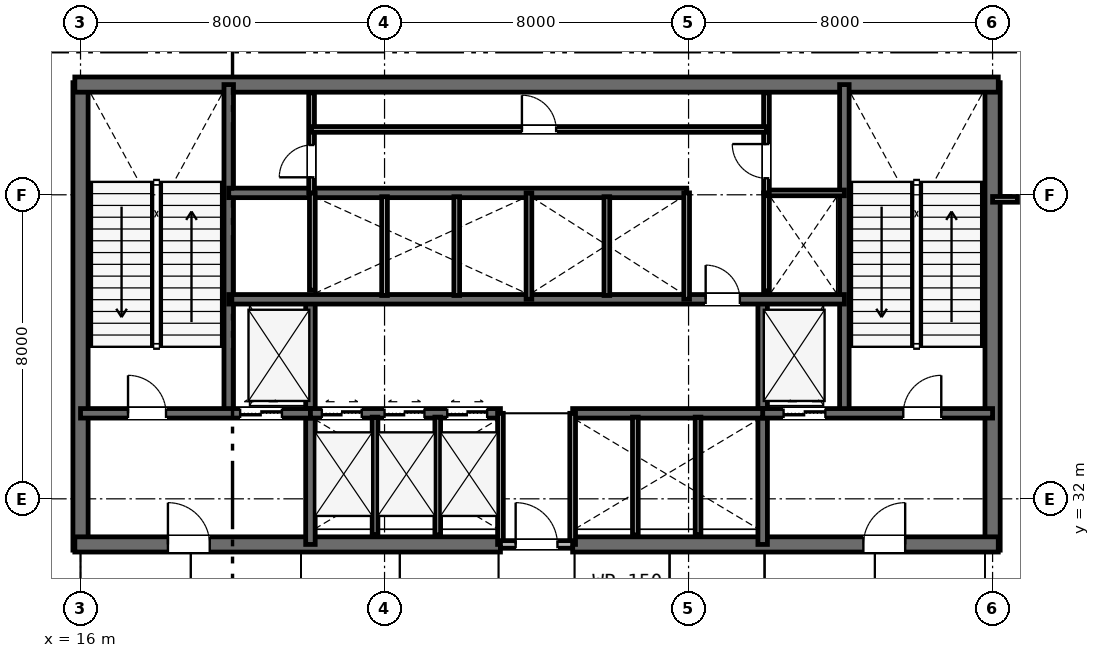
"""IFC4 building model, lengths in metres.
Left out: names, types, materials, properties, quantities, classifications, styles, units other than length and angle.
Written with IfcOpenShell. Run it as: python <this file> out.ifc"""

import sys

from ifc_helpers import new_model, si_unit, direction, frame, frame_2d, origin, place, context, subcontext, project, spatial, rectangle, extrude, element, fill, save


model = new_model("IFC4")
c1 = context("Model", 3, precision=1e-05, world=origin(), true_north=direction((0.0, 1.0)))
c2 = subcontext(c1, "Body", "Model", "MODEL_VIEW")
j1 = project(units=[si_unit("LENGTHUNIT", "METRE"), si_unit("PLANEANGLEUNIT", "RADIAN")], contexts=[c1])
p1 = place(None, origin())
s1 = spatial("IfcSite", under=j1, at=p1, CompositionType="ELEMENT")
p2 = place(p1, origin())
s2 = spatial("IfcBuilding", under=s1, at=p2, CompositionType="ELEMENT")
p3 = place(p2, frame((0.0, 0.0, 11.1)))
s3 = spatial("IfcBuildingStorey", under=s2, at=p3, CompositionType="ELEMENT", Elevation=11.1)
for number, where, z_axis, x_axis in (
    (1, (16.0, 30.65, 0.0), (0.0, 0.0, 1.0), (0.0, 1.0, 0.0)),
    (2, (40.0, 30.65, 0.0), (0.0, 0.0, 1.0), (0.0, 1.0, 0.0)),
):
    element("IfcWall", number, at=place(p3, frame(where, z_axis=z_axis, x_axis=x_axis)), inside=s3, PredefinedType="SHEAR", context=c2, shape_type="SweptSolid", body=[
        extrude(rectangle(XDim=12.3, YDim=0.4, at=frame_2d((6.15, 0.0))), origin(), (0.0, 0.0, 1.0), 4.8),
    ])
p4 = place(p3, frame((15.85, 42.9, 0.0), z_axis=(0.0, 0.0, 1.0), x_axis=(1.0, 0.0, 0.0)))
e3 = element("IfcWall", 3, at=p4, inside=s3, PredefinedType="SHEAR", context=c2, shape_type="SweptSolid", body=[
    extrude(rectangle(XDim=24.3, YDim=0.4, at=frame_2d((12.15, 0.0))), origin(), (0.0, 0.0, 1.0), 4.8),
])
p5 = place(p3, frame((15.85, 30.8, 0.0), z_axis=(0.0, 0.0, 1.0), x_axis=(1.0, 0.0, 0.0)))
e4 = element("IfcWall", 4, at=p5, inside=s3, PredefinedType="SHEAR", context=c2, shape_type="SweptSolid", body=[
    extrude(rectangle(XDim=11.2, YDim=0.4, at=frame_2d((5.6, 0.0))), origin(), (0.0, 0.0, 1.0), 4.8),
])
p6 = place(p5, frame((2.45, 0.0, 0.0)))
e5 = element("IfcOpeningElement", 5, at=p6, cuts=e4, PredefinedType="OPENING", context=c2, shape_type="SweptSolid", body=[
    extrude(rectangle(XDim=1.1, YDim=2.15, at=frame_2d((0.55, 1.075))), frame((0.0, 0.21, 0.0), z_axis=(0.0, -1.0, 0.0), x_axis=(1.0, 0.0, 0.0)), (0.0, 0.0, 1.0), 0.42),
])
p7 = place(p3, frame((28.95, 30.8, 0.0), z_axis=(0.0, 0.0, 1.0), x_axis=(1.0, 0.0, 0.0)))
e6 = element("IfcWall", 6, at=p7, inside=s3, PredefinedType="SHEAR", context=c2, shape_type="SweptSolid", body=[
    extrude(rectangle(XDim=11.2, YDim=0.4, at=frame_2d((5.6, 0.0))), origin(), (0.0, 0.0, 1.0), 4.8),
])
p8 = place(p7, frame((7.65, 0.0, 0.0)))
e7 = element("IfcOpeningElement", 7, at=p8, cuts=e6, PredefinedType="OPENING", context=c2, shape_type="SweptSolid", body=[
    extrude(rectangle(XDim=1.1, YDim=2.15, at=frame_2d((0.55, 1.075))), frame((0.0, 0.21, 0.0), z_axis=(0.0, -1.0, 0.0), x_axis=(1.0, 0.0, 0.0)), (0.0, 0.0, 1.0), 0.42),
])
for number, where, z_axis, x_axis in (
    (8, (19.9, 34.25, 0.0), (0.0, 0.0, 1.0), (0.0, 1.0, 0.0)),
    (9, (36.1, 34.25, 0.0), (0.0, 0.0, 1.0), (0.0, 1.0, 0.0)),
):
    element("IfcWall", number, at=place(p3, frame(where, z_axis=z_axis, x_axis=x_axis)), inside=s3, PredefinedType="SHEAR", context=c2, shape_type="SweptSolid", body=[
        extrude(rectangle(XDim=8.65, YDim=0.25, at=frame_2d((4.325, 0.0))), origin(), (0.0, 0.0, 1.0), 4.8),
    ])
for number, where, z_axis, x_axis in (
    (10, (22.05, 30.8, 0.0), (0.0, 0.0, 1.0), (0.0, 1.0, 0.0)),
    (11, (33.95, 30.8, 0.0), (0.0, 0.0, 1.0), (0.0, 1.0, 0.0)),
):
    element("IfcWall", number, at=place(p3, frame(where, z_axis=z_axis, x_axis=x_axis)), inside=s3, PredefinedType="SHEAR", context=c2, shape_type="SweptSolid", body=[
        extrude(rectangle(XDim=6.45, YDim=0.25, at=frame_2d((3.225, 0.0))), origin(), (0.0, 0.0, 1.0), 4.8),
    ])
p9 = place(p3, frame((16.0, 34.25, 0.0), z_axis=(0.0, 0.0, 1.0), x_axis=(1.0, 0.0, 0.0)))
e12 = element("IfcWall", 12, at=p9, inside=s3, PredefinedType="SHEAR", context=c2, shape_type="SweptSolid", body=[
    extrude(rectangle(XDim=6.05, YDim=0.25, at=frame_2d((3.025, 0.0))), origin(), (0.0, 0.0, 1.0), 4.8),
])
p10 = place(p9, frame((1.25, 0.0, 0.0)))
e13 = element("IfcOpeningElement", 13, at=p10, cuts=e12, PredefinedType="OPENING", context=c2, shape_type="SweptSolid", body=[
    extrude(rectangle(XDim=1.0, YDim=2.15, at=frame_2d((0.5, 1.075))), frame((0.0, 0.135, 0.0), z_axis=(0.0, -1.0, 0.0), x_axis=(1.0, 0.0, 0.0)), (0.0, 0.0, 1.0), 0.27),
])
p11 = place(p9, frame((4.2, 0.0, 0.0)))
e14 = element("IfcOpeningElement", 14, at=p11, cuts=e12, PredefinedType="OPENING", context=c2, shape_type="SweptSolid", body=[
    extrude(rectangle(XDim=1.1, YDim=2.15, at=frame_2d((0.55, 1.075))), frame((0.0, 0.135, 0.0), z_axis=(0.0, -1.0, 0.0), x_axis=(1.0, 0.0, 0.0)), (0.0, 0.0, 1.0), 0.27),
])
p12 = place(p3, frame((33.95, 34.25, 0.0), z_axis=(0.0, 0.0, 1.0), x_axis=(1.0, 0.0, 0.0)))
e15 = element("IfcWall", 15, at=p12, inside=s3, PredefinedType="SHEAR", context=c2, shape_type="SweptSolid", body=[
    extrude(rectangle(XDim=6.05, YDim=0.25, at=frame_2d((3.025, 0.0))), origin(), (0.0, 0.0, 1.0), 4.8),
])
p13 = place(p12, frame((3.7, 0.0, 0.0)))
e16 = element("IfcOpeningElement", 16, at=p13, cuts=e15, PredefinedType="OPENING", context=c2, shape_type="SweptSolid", body=[
    extrude(rectangle(XDim=1.0, YDim=2.15, at=frame_2d((0.5, 1.075))), frame((0.0, 0.135, 0.0), z_axis=(0.0, -1.0, 0.0), x_axis=(1.0, 0.0, 0.0)), (0.0, 0.0, 1.0), 0.27),
])
p14 = place(p12, frame((0.55, 0.0, 0.0)))
e17 = element("IfcOpeningElement", 17, at=p14, cuts=e15, PredefinedType="OPENING", context=c2, shape_type="SweptSolid", body=[
    extrude(rectangle(XDim=1.1, YDim=2.15, at=frame_2d((0.55, 1.075))), frame((0.0, 0.135, 0.0), z_axis=(0.0, -1.0, 0.0), x_axis=(1.0, 0.0, 0.0)), (0.0, 0.0, 1.0), 0.27),
])
p15 = place(p3, frame((22.05, 34.25, 0.0), z_axis=(0.0, 0.0, 1.0), x_axis=(1.0, 0.0, 0.0)))
e18 = element("IfcWall", 18, at=p15, inside=s3, PredefinedType="SHEAR", context=c2, shape_type="SweptSolid", body=[
    extrude(rectangle(XDim=5.0, YDim=0.25, at=frame_2d((2.5, 0.0))), origin(), (0.0, 0.0, 1.0), 4.8),
])
p16 = place(p15, frame((0.3, 0.0, 0.0)))
e19 = element("IfcOpeningElement", 19, at=p16, cuts=e18, PredefinedType="OPENING", context=c2, shape_type="SweptSolid", body=[
    extrude(rectangle(XDim=1.05, YDim=2.15, at=frame_2d((0.525, 1.075))), frame((0.0, 0.135, 0.0), z_axis=(0.0, -1.0, 0.0), x_axis=(1.0, 0.0, 0.0)), (0.0, 0.0, 1.0), 0.27),
])
p17 = place(p15, frame((1.95, 0.0, 0.0)))
e20 = element("IfcOpeningElement", 20, at=p17, cuts=e18, PredefinedType="OPENING", context=c2, shape_type="SweptSolid", body=[
    extrude(rectangle(XDim=1.05, YDim=2.15, at=frame_2d((0.525, 1.075))), frame((0.0, 0.135, 0.0), z_axis=(0.0, -1.0, 0.0), x_axis=(1.0, 0.0, 0.0)), (0.0, 0.0, 1.0), 0.27),
])
p18 = place(p15, frame((3.6, 0.0, 0.0)))
e21 = element("IfcOpeningElement", 21, at=p18, cuts=e18, PredefinedType="OPENING", context=c2, shape_type="SweptSolid", body=[
    extrude(rectangle(XDim=1.05, YDim=2.15, at=frame_2d((0.525, 1.075))), frame((0.0, 0.135, 0.0), z_axis=(0.0, -1.0, 0.0), x_axis=(1.0, 0.0, 0.0)), (0.0, 0.0, 1.0), 0.27),
])
p19 = place(p3, frame((28.95, 34.25, 0.0), z_axis=(0.0, 0.0, 1.0), x_axis=(1.0, 0.0, 0.0)))
e22 = element("IfcWall", 22, at=p19, inside=s3, PredefinedType="SHEAR", context=c2, shape_type="SweptSolid", body=[
    extrude(rectangle(XDim=5.0, YDim=0.25, at=frame_2d((2.5, 0.0))), origin(), (0.0, 0.0, 1.0), 4.8),
])
p20 = place(p3, frame((19.9, 37.25, 0.0), z_axis=(0.0, 0.0, 1.0), x_axis=(1.0, 0.0, 0.0)))
e23 = element("IfcWall", 23, at=p20, inside=s3, PredefinedType="SHEAR", context=c2, shape_type="SweptSolid", body=[
    extrude(rectangle(XDim=16.2, YDim=0.25, at=frame_2d((8.1, 0.0))), origin(), (0.0, 0.0, 1.0), 4.8),
])
p21 = place(p20, frame((12.55, 0.0, 0.0)))
e24 = element("IfcOpeningElement", 24, at=p21, cuts=e23, PredefinedType="OPENING", context=c2, shape_type="SweptSolid", body=[
    extrude(rectangle(XDim=0.9, YDim=2.15, at=frame_2d((0.45, 1.075))), frame((0.0, 0.135, 0.0), z_axis=(0.0, -1.0, 0.0), x_axis=(1.0, 0.0, 0.0)), (0.0, 0.0, 1.0), 0.27),
])
p22 = place(p3, frame((19.9, 40.05, 0.0), z_axis=(0.0, 0.0, 1.0), x_axis=(1.0, 0.0, 0.0)))
e25 = element("IfcWall", 25, at=p22, inside=s3, PredefinedType="SHEAR", context=c2, shape_type="SweptSolid", body=[
    extrude(rectangle(XDim=12.05, YDim=0.25, at=frame_2d((6.025, 0.0))), origin(), (0.0, 0.0, 1.0), 4.8),
])
for number, where, z_axis, x_axis in (
    (26, (27.05, 30.8, 0.0), (0.0, 0.0, 1.0), (0.0, 1.0, 0.0)),
    (27, (28.95, 30.8, 0.0), (0.0, 0.0, 1.0), (0.0, 1.0, 0.0)),
):
    element("IfcWall", number, at=place(p3, frame(where, z_axis=z_axis, x_axis=x_axis)), inside=s3, PredefinedType="PLUMBINGWALL", context=c2, shape_type="SweptSolid", body=[
        extrude(rectangle(XDim=3.45, YDim=0.15, at=frame_2d((1.725, 0.0))), origin(), (0.0, 0.0, 1.0), 4.21),
    ])
p23 = place(p3, frame((27.05, 30.8, 0.0), z_axis=(0.0, 0.0, 1.0), x_axis=(1.0, 0.0, 0.0)))
e28 = element("IfcWall", 28, at=p23, inside=s3, PredefinedType="PARTITIONING", context=c2, shape_type="SweptSolid", body=[
    extrude(rectangle(XDim=1.9, YDim=0.2, at=frame_2d((0.95, 0.0))), origin(), (0.0, 0.0, 1.0), 4.21),
])
p24 = place(p23, frame((0.4, 0.0, 0.0)))
e29 = element("IfcOpeningElement", 29, at=p24, cuts=e28, PredefinedType="OPENING", context=c2, shape_type="SweptSolid", body=[
    extrude(rectangle(XDim=1.1, YDim=2.15, at=frame_2d((0.55, 1.075))), frame((0.0, 0.11, 0.0), z_axis=(0.0, -1.0, 0.0), x_axis=(1.0, 0.0, 0.0)), (0.0, 0.0, 1.0), 0.22),
])
for number, where, z_axis, x_axis in (
    (30, (23.75, 31.05, 0.0), (0.0, 0.0, 1.0), (0.0, 1.0, 0.0)),
    (31, (25.4, 31.05, 0.0), (0.0, 0.0, 1.0), (0.0, 1.0, 0.0)),
    (32, (30.6, 31.05, 0.0), (0.0, 0.0, 1.0), (0.0, 1.0, 0.0)),
    (33, (32.25, 31.05, 0.0), (0.0, 0.0, 1.0), (0.0, 1.0, 0.0)),
):
    element("IfcWall", number, at=place(p3, frame(where, z_axis=z_axis, x_axis=x_axis)), inside=s3, PredefinedType="PLUMBINGWALL", context=c2, shape_type="SweptSolid", body=[
        extrude(rectangle(XDim=3.1, YDim=0.15, at=frame_2d((1.55, 0.0))), origin(), (0.0, 0.0, 1.0), 4.47),
    ])
p25 = place(p3, frame((22.1, 37.49, 0.0), z_axis=(0.0, 0.0, 1.0), x_axis=(0.0, 1.0, 0.0)))
e34 = element("IfcWall", 34, at=p25, inside=s3, PredefinedType="PLUMBINGWALL", context=c2, shape_type="SweptSolid", body=[
    extrude(rectangle(XDim=2.56, YDim=0.15, at=frame_2d((1.28, 0.0))), origin(), (0.0, 0.0, 1.0), 4.47),
])
p26 = place(p3, frame((27.8, 37.25, 0.0), z_axis=(0.0, 0.0, 1.0), x_axis=(0.0, 1.0, 0.0)))
e35 = element("IfcWall", 35, at=p26, inside=s3, PredefinedType="PLUMBINGWALL", context=c2, shape_type="SweptSolid", body=[
    extrude(rectangle(XDim=2.8, YDim=0.15, at=frame_2d((1.4, 0.0))), origin(), (0.0, 0.0, 1.0), 4.47),
])
for number, where, z_axis, x_axis in (
    (36, (24.0, 37.35, 0.0), (0.0, 0.0, 1.0), (0.0, 1.0, 0.0)),
    (37, (25.9, 37.35, 0.0), (0.0, 0.0, 1.0), (0.0, 1.0, 0.0)),
):
    element("IfcWall", number, at=place(p3, frame(where, z_axis=z_axis, x_axis=x_axis)), inside=s3, PredefinedType="PLUMBINGWALL", context=c2, shape_type="SweptSolid", body=[
        extrude(rectangle(XDim=2.6, YDim=0.15, at=frame_2d((1.3, 0.0))), origin(), (0.0, 0.0, 1.0), 4.47),
    ])
p27 = place(p3, frame((31.95, 37.25, 0.0), z_axis=(0.0, 0.0, 1.0), x_axis=(0.0, 1.0, 0.0)))
e38 = element("IfcWall", 38, at=p27, inside=s3, PredefinedType="PLUMBINGWALL", context=c2, shape_type="SweptSolid", body=[
    extrude(rectangle(XDim=2.8, YDim=0.15, at=frame_2d((1.4, 0.0))), origin(), (0.0, 0.0, 1.0), 4.47),
])
p28 = place(p3, frame((29.85, 37.35, 0.0), z_axis=(0.0, 0.0, 1.0), x_axis=(0.0, 1.0, 0.0)))
e39 = element("IfcWall", 39, at=p28, inside=s3, PredefinedType="PLUMBINGWALL", context=c2, shape_type="SweptSolid", body=[
    extrude(rectangle(XDim=2.6, YDim=0.15, at=frame_2d((1.3, 0.0))), origin(), (0.0, 0.0, 1.0), 4.47),
])
p29 = place(p3, frame((34.05, 37.473, 0.0), z_axis=(0.0, 0.0, 1.0), x_axis=(0.0, 1.0, 0.0)))
e40 = element("IfcWall", 40, at=p29, inside=s3, PredefinedType="PLUMBINGWALL", context=c2, shape_type="SweptSolid", body=[
    extrude(rectangle(XDim=2.577, YDim=0.15, at=frame_2d((1.288, 0.0))), origin(), (0.0, 0.0, 1.0), 4.47),
])
p30 = place(p3, frame((34.05, 40.05, 0.0), z_axis=(0.0, 0.0, 1.0), x_axis=(1.0, 0.0, 0.0)))
e41 = element("IfcWall", 41, at=p30, inside=s3, PredefinedType="PARTITIONING", context=c2, shape_type="SweptSolid", body=[
    extrude(rectangle(XDim=2.05, YDim=0.15, at=frame_2d((1.025, 0.0))), origin(), (0.0, 0.0, 1.0), 4.47),
])
p31 = place(p3, frame((34.05, 40.05, 0.0), z_axis=(0.0, 0.0, 1.0), x_axis=(0.0, 1.0, 0.0)))
e42 = element("IfcWall", 42, at=p31, inside=s3, PredefinedType="PARTITIONING", context=c2, shape_type="SweptSolid", body=[
    extrude(rectangle(XDim=2.63, YDim=0.15, at=frame_2d((1.315, 0.0))), origin(), (0.0, 0.0, 1.0), 4.47),
])
p32 = place(p31, frame((0.385, 0.0, 0.0)))
e43 = element("IfcOpeningElement", 43, at=p32, cuts=e42, PredefinedType="OPENING", context=c2, shape_type="SweptSolid", body=[
    extrude(rectangle(XDim=0.9, YDim=2.15, at=frame_2d((0.45, 1.075))), frame((0.0, 0.085, 0.0), z_axis=(0.0, -1.0, 0.0), x_axis=(1.0, 0.0, 0.0)), (0.0, 0.0, 1.0), 0.17),
])
p33 = place(p3, frame((22.08, 40.05, 0.0), z_axis=(0.0, 0.0, 1.0), x_axis=(0.0, 1.0, 0.0)))
e44 = element("IfcWall", 44, at=p33, inside=s3, PredefinedType="PARTITIONING", context=c2, shape_type="SweptSolid", body=[
    extrude(rectangle(XDim=2.63, YDim=0.15, at=frame_2d((1.315, 0.0))), origin(), (0.0, 0.0, 1.0), 4.47),
])
p34 = place(p33, frame((0.41, 0.0, 0.0)))
e45 = element("IfcOpeningElement", 45, at=p34, cuts=e44, PredefinedType="OPENING", context=c2, shape_type="SweptSolid", body=[
    extrude(rectangle(XDim=0.85, YDim=2.15, at=frame_2d((0.425, 1.075))), frame((0.0, 0.085, 0.0), z_axis=(0.0, -1.0, 0.0), x_axis=(1.0, 0.0, 0.0)), (0.0, 0.0, 1.0), 0.17),
])
p35 = place(p3, frame((22.08, 41.72, 0.0), z_axis=(0.0, 0.0, 1.0), x_axis=(1.0, 0.0, 0.0)))
e46 = element("IfcWall", 46, at=p35, inside=s3, PredefinedType="PARTITIONING", context=c2, shape_type="SweptSolid", body=[
    extrude(rectangle(XDim=11.97, YDim=0.15, at=frame_2d((5.985, 0.0))), origin(), (0.0, 0.0, 1.0), 4.47),
])
p36 = place(p35, frame((5.535, 0.0, 0.0)))
e47 = element("IfcOpeningElement", 47, at=p36, cuts=e46, PredefinedType="OPENING", context=c2, shape_type="SweptSolid", body=[
    extrude(rectangle(XDim=0.9, YDim=2.15, at=frame_2d((0.45, 1.075))), frame((0.0, 0.085, 0.0), z_axis=(0.0, -1.0, 0.0), x_axis=(1.0, 0.0, 0.0)), (0.0, 0.0, 1.0), 0.17),
])
p37 = place(p3, frame((40.0, 39.88, 0.0), z_axis=(0.0, 0.0, 1.0), x_axis=(1.0, 0.0, 0.0)))
e48 = element("IfcWall", 48, at=p37, inside=s3, PredefinedType="PARTITIONING", context=c2, shape_type="SweptSolid", body=[
    extrude(rectangle(XDim=0.655, YDim=0.15, at=frame_2d((0.328, 0.0))), origin(), (0.0, 0.0, 1.0), 4.47),
])
p38 = place(p24, origin())
e49 = element("IfcDoor", 49, at=p38, inside=s3, OperationType="SINGLE_SWING_LEFT", PredefinedType="DOOR", context=c2, shape_type="SweptSolid", body=[
    extrude(rectangle(XDim=1.1, YDim=2.15, at=frame_2d((0.55, 1.075))), frame((0.0, 0.025, 0.0), z_axis=(0.0, -1.0, 0.0), x_axis=(1.0, 0.0, 0.0)), (0.0, 0.0, 1.0), 0.05),
])
fill(e29, e49)
p39 = place(p10, origin())
e50 = element("IfcDoor", 50, at=p39, inside=s3, OperationType="SINGLE_SWING_LEFT", PredefinedType="DOOR", context=c2, shape_type="SweptSolid", body=[
    extrude(rectangle(XDim=1.0, YDim=2.15, at=frame_2d((0.5, 1.075))), frame((0.0, 0.025, 0.0), z_axis=(0.0, -1.0, 0.0), x_axis=(1.0, 0.0, 0.0)), (0.0, 0.0, 1.0), 0.05),
])
fill(e13, e50)
p40 = place(p13, origin())
e51 = element("IfcDoor", 51, at=p40, inside=s3, OperationType="SINGLE_SWING_RIGHT", PredefinedType="DOOR", context=c2, shape_type="SweptSolid", body=[
    extrude(rectangle(XDim=1.0, YDim=2.15, at=frame_2d((0.5, 1.075))), frame((0.0, 0.025, 0.0), z_axis=(0.0, -1.0, 0.0), x_axis=(1.0, 0.0, 0.0)), (0.0, 0.0, 1.0), 0.05),
])
fill(e16, e51)
p41 = place(p6, origin())
e52 = element("IfcDoor", 52, at=p41, inside=s3, OperationType="SINGLE_SWING_LEFT", PredefinedType="DOOR", context=c2, shape_type="SweptSolid", body=[
    extrude(rectangle(XDim=1.1, YDim=2.15, at=frame_2d((0.55, 1.075))), frame((0.0, 0.025, 0.0), z_axis=(0.0, -1.0, 0.0), x_axis=(1.0, 0.0, 0.0)), (0.0, 0.0, 1.0), 0.05),
])
fill(e5, e52)
p42 = place(p8, origin())
e53 = element("IfcDoor", 53, at=p42, inside=s3, OperationType="SINGLE_SWING_RIGHT", PredefinedType="DOOR", context=c2, shape_type="SweptSolid", body=[
    extrude(rectangle(XDim=1.1, YDim=2.15, at=frame_2d((0.55, 1.075))), frame((0.0, 0.025, 0.0), z_axis=(0.0, -1.0, 0.0), x_axis=(1.0, 0.0, 0.0)), (0.0, 0.0, 1.0), 0.05),
])
fill(e7, e53)
p43 = place(p21, origin())
e54 = element("IfcDoor", 54, at=p43, inside=s3, OperationType="SINGLE_SWING_LEFT", PredefinedType="DOOR", context=c2, shape_type="SweptSolid", body=[
    extrude(rectangle(XDim=0.9, YDim=2.15, at=frame_2d((0.45, 1.075))), frame((0.0, 0.025, 0.0), z_axis=(0.0, -1.0, 0.0), x_axis=(1.0, 0.0, 0.0)), (0.0, 0.0, 1.0), 0.05),
])
fill(e24, e54)
p44 = place(p32, origin())
e55 = element("IfcDoor", 55, at=p44, inside=s3, OperationType="SINGLE_SWING_RIGHT", PredefinedType="DOOR", context=c2, shape_type="SweptSolid", body=[
    extrude(rectangle(XDim=0.9, YDim=2.15, at=frame_2d((0.45, 1.075))), frame((0.0, 0.025, 0.0), z_axis=(0.0, -1.0, 0.0), x_axis=(1.0, 0.0, 0.0)), (0.0, 0.0, 1.0), 0.05),
])
fill(e43, e55)
p45 = place(p34, origin())
e56 = element("IfcDoor", 56, at=p45, inside=s3, OperationType="SINGLE_SWING_LEFT", PredefinedType="DOOR", context=c2, shape_type="SweptSolid", body=[
    extrude(rectangle(XDim=0.85, YDim=2.15, at=frame_2d((0.425, 1.075))), frame((0.0, 0.025, 0.0), z_axis=(0.0, -1.0, 0.0), x_axis=(1.0, 0.0, 0.0)), (0.0, 0.0, 1.0), 0.05),
])
fill(e45, e56)
p46 = place(p36, origin())
e57 = element("IfcDoor", 57, at=p46, inside=s3, OperationType="SINGLE_SWING_LEFT", PredefinedType="DOOR", context=c2, shape_type="SweptSolid", body=[
    extrude(rectangle(XDim=0.9, YDim=2.15, at=frame_2d((0.45, 1.075))), frame((0.0, 0.025, 0.0), z_axis=(0.0, -1.0, 0.0), x_axis=(1.0, 0.0, 0.0)), (0.0, 0.0, 1.0), 0.05),
])
fill(e47, e57)
p47 = place(p11, origin())
e58 = element("IfcDoor", 58, at=p47, inside=s3, OperationType="DOUBLE_DOOR_SLIDING", PredefinedType="DOOR", context=c2, shape_type="SweptSolid", body=[
    extrude(rectangle(XDim=1.1, YDim=2.15, at=frame_2d((0.55, 1.075))), frame((0.0, 0.025, 0.0), z_axis=(0.0, -1.0, 0.0), x_axis=(1.0, 0.0, 0.0)), (0.0, 0.0, 1.0), 0.05),
])
fill(e14, e58)
p48 = place(p14, origin())
e59 = element("IfcDoor", 59, at=p48, inside=s3, OperationType="DOUBLE_DOOR_SLIDING", PredefinedType="DOOR", context=c2, shape_type="SweptSolid", body=[
    extrude(rectangle(XDim=1.1, YDim=2.15, at=frame_2d((0.55, 1.075))), frame((0.0, 0.025, 0.0), z_axis=(0.0, -1.0, 0.0), x_axis=(1.0, 0.0, 0.0)), (0.0, 0.0, 1.0), 0.05),
])
fill(e17, e59)
p49 = place(p16, origin())
e60 = element("IfcDoor", 60, at=p49, inside=s3, OperationType="DOUBLE_DOOR_SLIDING", PredefinedType="DOOR", context=c2, shape_type="SweptSolid", body=[
    extrude(rectangle(XDim=1.05, YDim=2.15, at=frame_2d((0.525, 1.075))), frame((0.0, 0.025, 0.0), z_axis=(0.0, -1.0, 0.0), x_axis=(1.0, 0.0, 0.0)), (0.0, 0.0, 1.0), 0.05),
])
fill(e19, e60)
p50 = place(p17, origin())
e61 = element("IfcDoor", 61, at=p50, inside=s3, OperationType="DOUBLE_DOOR_SLIDING", PredefinedType="DOOR", context=c2, shape_type="SweptSolid", body=[
    extrude(rectangle(XDim=1.05, YDim=2.15, at=frame_2d((0.525, 1.075))), frame((0.0, 0.025, 0.0), z_axis=(0.0, -1.0, 0.0), x_axis=(1.0, 0.0, 0.0)), (0.0, 0.0, 1.0), 0.05),
])
fill(e20, e61)
p51 = place(p18, origin())
e62 = element("IfcDoor", 62, at=p51, inside=s3, OperationType="DOUBLE_DOOR_SLIDING", PredefinedType="DOOR", context=c2, shape_type="SweptSolid", body=[
    extrude(rectangle(XDim=1.05, YDim=2.15, at=frame_2d((0.525, 1.075))), frame((0.0, 0.025, 0.0), z_axis=(0.0, -1.0, 0.0), x_axis=(1.0, 0.0, 0.0)), (0.0, 0.0, 1.0), 0.05),
])
fill(e21, e62)
save(model, sys.argv[1])
